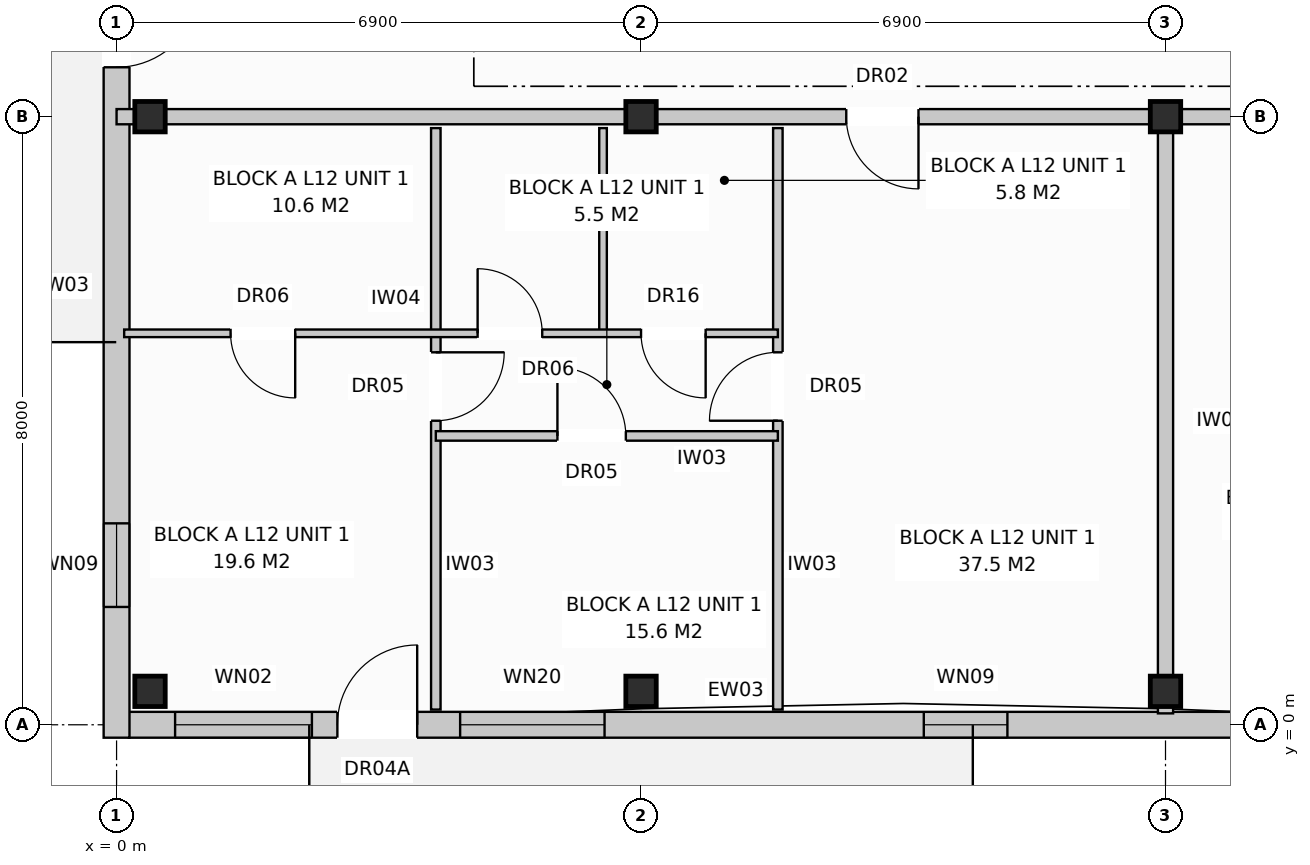
"""IFC4 building model, lengths in metres.
Left out: names, types, materials, properties, quantities, classifications, styles, units other than length and angle.
Written with IfcOpenShell. Run it as: python <this file> out.ifc"""

import sys

from ifc_helpers import new_model, si_unit, direction, frame, frame_2d, origin, origin_with_axes, origin_2d, place, context, subcontext, project, spatial, rectangle, extrude, element, fill, save


model = new_model("IFC4")
c1 = context("Model", 3, precision=1e-05, world=origin(), true_north=direction((0.0, 1.0)))
c2 = subcontext(c1, "Body", "Model", "MODEL_VIEW")
j1 = project(units=[si_unit("LENGTHUNIT", "METRE"), si_unit("PLANEANGLEUNIT", "RADIAN")], contexts=[c1])
p1 = place(None, origin())
s1 = spatial("IfcSite", under=j1, at=p1, CompositionType="ELEMENT")
p2 = place(p1, origin())
s2 = spatial("IfcBuilding", under=s1, at=p2, CompositionType="ELEMENT")
p3 = place(p2, frame((0.0, 0.0, 40.0)))
s3 = spatial("IfcBuildingStorey", under=s2, at=p3, CompositionType="ELEMENT", Elevation=40.0)
for number, where, z_axis, x_axis in (
    (1, (0.44, 0.44, 0.0), (0.0, 0.0, 1.0), (1.0, 0.0, 0.0)),
    (2, (0.44, 8.0, 0.0), (0.0, 0.0, 1.0), (1.0, 0.0, 0.0)),
    (3, (6.9, 0.44, 0.0), (0.0, 0.0, 1.0), (1.0, 0.0, 0.0)),
    (4, (6.9, 8.0, 0.0), (0.0, 0.0, 1.0), (1.0, 0.0, 0.0)),
    (5, (13.8, 0.44, 0.0), (0.0, 0.0, 1.0), (1.0, 0.0, 0.0)),
    (6, (13.8, 8.0, 0.0), (0.0, 0.0, 1.0), (1.0, 0.0, 0.0)),
):
    element("IfcColumn", number, at=place(p3, frame(where, z_axis=z_axis, x_axis=x_axis)), inside=s3, PredefinedType="COLUMN", context=c2, shape_type="SweptSolid", body=[
        extrude(rectangle(XDim=0.4, YDim=0.4, at=origin_2d()), origin(), (0.0, 0.0, 1.0), 3.2),
    ])
p4 = place(p3, frame((0.16, 0.0, 0.0), z_axis=(0.0, 0.0, 1.0), x_axis=(1.0, 0.0, 0.0)))
e7 = element("IfcWall", 7, at=p4, inside=s3, PredefinedType="STANDARD", context=c2, shape_type="SweptSolid", body=[
    extrude(rectangle(XDim=41.08, YDim=0.34, at=frame_2d((20.54, 0.0))), origin(), (0.0, 0.0, 1.0), 2.97),
])
p5 = place(p4, frame((2.745, 0.0, 0.0)))
e8 = element("IfcOpeningElement", 8, at=p5, cuts=e7, PredefinedType="OPENING", context=c2, shape_type="SweptSolid", body=[
    extrude(rectangle(XDim=1.05, YDim=2.12, at=frame_2d((0.525, 1.06))), frame((0.0, 0.182, 0.0), z_axis=(0.0, -1.0, 0.0), x_axis=(1.0, 0.0, 0.0)), (0.0, 0.0, 1.0), 0.364),
])
p6 = place(p4, frame((17.545, 0.0, 0.0)))
e9 = element("IfcOpeningElement", 9, at=p6, cuts=e7, PredefinedType="OPENING", context=c2, shape_type="SweptSolid", body=[
    extrude(rectangle(XDim=1.05, YDim=2.12, at=frame_2d((0.525, 1.06))), frame((0.0, 0.182, 0.0), z_axis=(0.0, -1.0, 0.0), x_axis=(1.0, 0.0, 0.0)), (0.0, 0.0, 1.0), 0.364),
])
p7 = place(p4, frame((30.045, 0.0, 0.0)))
e10 = element("IfcOpeningElement", 10, at=p7, cuts=e7, PredefinedType="OPENING", context=c2, shape_type="SweptSolid", body=[
    extrude(rectangle(XDim=1.05, YDim=2.12, at=frame_2d((0.525, 1.06))), frame((0.0, 0.182, 0.0), z_axis=(0.0, -1.0, 0.0), x_axis=(1.0, 0.0, 0.0)), (0.0, 0.0, 1.0), 0.364),
])
p8 = place(p4, frame((0.61, 0.0, 0.8)))
e11 = element("IfcOpeningElement", 11, at=p8, cuts=e7, PredefinedType="OPENING", context=c2, shape_type="SweptSolid", body=[
    extrude(rectangle(XDim=1.8, YDim=1.7, at=frame_2d((0.9, 0.85))), frame((0.0, 0.182, 0.0), z_axis=(0.0, -1.0, 0.0), x_axis=(1.0, 0.0, 0.0)), (0.0, 0.0, 1.0), 0.364),
])
p9 = place(p4, frame((4.36, 0.0, 0.72)))
e12 = element("IfcOpeningElement", 12, at=p9, cuts=e7, PredefinedType="OPENING", context=c2, shape_type="SweptSolid", body=[
    extrude(rectangle(XDim=1.9, YDim=1.85, at=frame_2d((0.95, 0.925))), frame((0.0, 0.182, 0.0), z_axis=(0.0, -1.0, 0.0), x_axis=(1.0, 0.0, 0.0)), (0.0, 0.0, 1.0), 0.364),
])
p10 = place(p4, frame((10.46, 0.0, 0.72)))
e13 = element("IfcOpeningElement", 13, at=p10, cuts=e7, PredefinedType="OPENING", context=c2, shape_type="SweptSolid", body=[
    extrude(rectangle(XDim=1.1, YDim=1.5, at=frame_2d((0.55, 0.75))), frame((0.0, 0.182, 0.0), z_axis=(0.0, -1.0, 0.0), x_axis=(1.0, 0.0, 0.0)), (0.0, 0.0, 1.0), 0.364),
])
p11 = place(p4, frame((15.76, 0.0, 0.72)))
e14 = element("IfcOpeningElement", 14, at=p11, cuts=e7, PredefinedType="OPENING", context=c2, shape_type="SweptSolid", body=[
    extrude(rectangle(XDim=1.1, YDim=1.5, at=frame_2d((0.55, 0.75))), frame((0.0, 0.182, 0.0), z_axis=(0.0, -1.0, 0.0), x_axis=(1.0, 0.0, 0.0)), (0.0, 0.0, 1.0), 0.364),
])
p12 = place(p4, frame((21.042, 0.0, 0.72)))
e15 = element("IfcOpeningElement", 15, at=p12, cuts=e7, PredefinedType="OPENING", context=c2, shape_type="SweptSolid", body=[
    extrude(rectangle(XDim=1.9, YDim=1.85, at=frame_2d((0.95, 0.925))), frame((0.0, 0.182, 0.0), z_axis=(0.0, -1.0, 0.0), x_axis=(1.0, 0.0, 0.0)), (0.0, 0.0, 1.0), 0.364),
])
p13 = place(p4, frame((24.66, 0.0, 0.72)))
e16 = element("IfcOpeningElement", 16, at=p13, cuts=e7, PredefinedType="OPENING", context=c2, shape_type="SweptSolid", body=[
    extrude(rectangle(XDim=1.1, YDim=1.5, at=frame_2d((0.55, 0.75))), frame((0.0, 0.182, 0.0), z_axis=(0.0, -1.0, 0.0), x_axis=(1.0, 0.0, 0.0)), (0.0, 0.0, 1.0), 0.364),
])
p14 = place(p4, frame((28.21, 0.0, 0.85)))
e17 = element("IfcOpeningElement", 17, at=p14, cuts=e7, PredefinedType="OPENING", context=c2, shape_type="SweptSolid", body=[
    extrude(rectangle(XDim=1.5, YDim=1.65, at=frame_2d((0.75, 0.825))), frame((0.0, 0.182, 0.0), z_axis=(0.0, -1.0, 0.0), x_axis=(1.0, 0.0, 0.0)), (0.0, 0.0, 1.0), 0.364),
])
p15 = place(p4, frame((31.86, 0.0, 0.72)))
e18 = element("IfcOpeningElement", 18, at=p15, cuts=e7, PredefinedType="OPENING", context=c2, shape_type="SweptSolid", body=[
    extrude(rectangle(XDim=1.9, YDim=1.85, at=frame_2d((0.95, 0.925))), frame((0.0, 0.182, 0.0), z_axis=(0.0, -1.0, 0.0), x_axis=(1.0, 0.0, 0.0)), (0.0, 0.0, 1.0), 0.364),
])
p16 = place(p4, frame((35.335, 0.0, 0.8)))
e19 = element("IfcOpeningElement", 19, at=p16, cuts=e7, PredefinedType="OPENING", context=c2, shape_type="SweptSolid", body=[
    extrude(rectangle(XDim=1.95, YDim=1.65, at=frame_2d((0.975, 0.825))), frame((0.0, 0.182, 0.0), z_axis=(0.0, -1.0, 0.0), x_axis=(1.0, 0.0, 0.0)), (0.0, 0.0, 1.0), 0.364),
])
p17 = place(p4, frame((38.675, 0.0, 0.8)))
e20 = element("IfcOpeningElement", 20, at=p17, cuts=e7, PredefinedType="OPENING", context=c2, shape_type="SweptSolid", body=[
    extrude(rectangle(XDim=1.8, YDim=1.7, at=frame_2d((0.9, 0.85))), frame((0.0, 0.182, 0.0), z_axis=(0.0, -1.0, 0.0), x_axis=(1.0, 0.0, 0.0)), (0.0, 0.0, 1.0), 0.364),
])
p18 = place(p3, frame((0.0, -0.17, 0.0), z_axis=(0.0, 0.0, 1.0), x_axis=(0.0, 1.0, 0.0)))
e21 = element("IfcWall", 21, at=p18, inside=s3, PredefinedType="STANDARD", context=c2, shape_type="SweptSolid", body=[
    extrude(rectangle(XDim=18.74, YDim=0.34, at=frame_2d((9.37, 0.0))), origin(), (0.0, 0.0, 1.0), 2.97),
])
p19 = place(p18, frame((8.82, 0.0, 0.0)))
e22 = element("IfcOpeningElement", 22, at=p19, cuts=e21, PredefinedType="OPENING", context=c2, shape_type="SweptSolid", body=[
    extrude(rectangle(XDim=1.1, YDim=2.1, at=frame_2d((0.55, 1.05))), frame((0.0, 0.182, 0.0), z_axis=(0.0, -1.0, 0.0), x_axis=(1.0, 0.0, 0.0)), (0.0, 0.0, 1.0), 0.364),
])
p20 = place(p18, frame((1.72, 0.0, 0.72)))
e23 = element("IfcOpeningElement", 23, at=p20, cuts=e21, PredefinedType="OPENING", context=c2, shape_type="SweptSolid", body=[
    extrude(rectangle(XDim=1.1, YDim=1.5, at=frame_2d((0.55, 0.75))), frame((0.0, 0.182, 0.0), z_axis=(0.0, -1.0, 0.0), x_axis=(1.0, 0.0, 0.0)), (0.0, 0.0, 1.0), 0.364),
])
p21 = place(p18, frame((15.92, 0.0, 0.72)))
e24 = element("IfcOpeningElement", 24, at=p21, cuts=e21, PredefinedType="OPENING", context=c2, shape_type="SweptSolid", body=[
    extrude(rectangle(XDim=1.1, YDim=1.5, at=frame_2d((0.55, 0.75))), frame((0.0, 0.182, 0.0), z_axis=(0.0, -1.0, 0.0), x_axis=(1.0, 0.0, 0.0)), (0.0, 0.0, 1.0), 0.364),
])
p22 = place(p3, frame((13.8, 7.85, 0.0), z_axis=(0.0, 0.0, 1.0), x_axis=(0.0, -1.0, 0.0)))
e25 = element("IfcWall", 25, at=p22, inside=s3, PredefinedType="PARTITIONING", context=c2, shape_type="SweptSolid", body=[
    extrude(rectangle(XDim=7.7, YDim=0.2, at=frame_2d((3.85, 0.0))), origin(), (0.0, 0.0, 1.0), 2.97),
])
p23 = place(p3, frame((0.0, 8.0, 0.0), z_axis=(0.0, 0.0, 1.0), x_axis=(1.0, 0.0, 0.0)))
e26 = element("IfcWall", 26, at=p23, inside=s3, PredefinedType="PARTITIONING", context=c2, shape_type="SweptSolid", body=[
    extrude(rectangle(XDim=13.8, YDim=0.2, at=frame_2d((6.9, 0.0))), origin(), (0.0, 0.0, 1.0), 2.41),
])
p24 = place(p23, frame((9.6, 0.0, 0.0)))
e27 = element("IfcOpeningElement", 27, at=p24, cuts=e26, PredefinedType="OPENING", context=c2, shape_type="SweptSolid", body=[
    extrude(rectangle(XDim=0.95, YDim=2.15, at=frame_2d((0.475, 1.075))), frame((0.0, 0.112, 0.0), z_axis=(0.0, -1.0, 0.0), x_axis=(1.0, 0.0, 0.0)), (0.0, 0.0, 1.0), 0.224),
])
p25 = place(p3, frame((8.7, 7.85, 0.0), z_axis=(0.0, 0.0, 1.0), x_axis=(0.0, -1.0, 0.0)))
e28 = element("IfcWall", 28, at=p25, inside=s3, PredefinedType="PARTITIONING", context=c2, shape_type="SweptSolid", body=[
    extrude(rectangle(XDim=7.65, YDim=0.125, at=frame_2d((3.825, 0.0))), origin(), (0.0, 0.0, 1.0), 2.97),
])
p26 = place(p25, frame((2.95, 0.0, 0.0)))
e29 = element("IfcOpeningElement", 29, at=p26, cuts=e28, PredefinedType="OPENING", context=c2, shape_type="SweptSolid", body=[
    extrude(rectangle(XDim=0.9, YDim=2.1, at=frame_2d((0.45, 1.05))), frame((0.0, 0.074, 0.0), z_axis=(0.0, -1.0, 0.0), x_axis=(1.0, 0.0, 0.0)), (0.0, 0.0, 1.0), 0.149),
])
p27 = place(p3, frame((4.2, 7.85, 0.0), z_axis=(0.0, 0.0, 1.0), x_axis=(0.0, -1.0, 0.0)))
e30 = element("IfcWall", 30, at=p27, inside=s3, PredefinedType="PARTITIONING", context=c2, shape_type="SweptSolid", body=[
    extrude(rectangle(XDim=7.65, YDim=0.125, at=frame_2d((3.825, 0.0))), origin(), (0.0, 0.0, 1.0), 2.97),
])
p28 = place(p27, frame((2.95, 0.0, 0.0)))
e31 = element("IfcOpeningElement", 31, at=p28, cuts=e30, PredefinedType="OPENING", context=c2, shape_type="SweptSolid", body=[
    extrude(rectangle(XDim=0.9, YDim=2.1, at=frame_2d((0.45, 1.05))), frame((0.0, 0.074, 0.0), z_axis=(0.0, -1.0, 0.0), x_axis=(1.0, 0.0, 0.0)), (0.0, 0.0, 1.0), 0.149),
])
p29 = place(p3, frame((6.4, 7.85, 0.0), z_axis=(0.0, 0.0, 1.0), x_axis=(0.0, -1.0, 0.0)))
e32 = element("IfcWall", 32, at=p29, inside=s3, PredefinedType="PARTITIONING", context=c2, shape_type="SweptSolid", body=[
    extrude(rectangle(XDim=2.7, YDim=0.1, at=frame_2d((1.35, 0.0))), origin(), (0.0, 0.0, 1.0), 2.97),
])
p30 = place(p3, frame((0.1, 5.15, 0.0), z_axis=(0.0, 0.0, 1.0), x_axis=(1.0, 0.0, 0.0)))
e33 = element("IfcWall", 33, at=p30, inside=s3, PredefinedType="PARTITIONING", context=c2, shape_type="SweptSolid", body=[
    extrude(rectangle(XDim=8.6, YDim=0.1, at=frame_2d((4.3, 0.0))), origin(), (0.0, 0.0, 1.0), 2.97),
])
p31 = place(p30, frame((1.4, 0.0, 0.0)))
e34 = element("IfcOpeningElement", 34, at=p31, cuts=e33, PredefinedType="OPENING", context=c2, shape_type="SweptSolid", body=[
    extrude(rectangle(XDim=0.85, YDim=2.05, at=frame_2d((0.425, 1.025))), frame((0.0, 0.062, 0.0), z_axis=(0.0, -1.0, 0.0), x_axis=(1.0, 0.0, 0.0)), (0.0, 0.0, 1.0), 0.124),
])
p32 = place(p30, frame((4.65, 0.0, 0.0)))
e35 = element("IfcOpeningElement", 35, at=p32, cuts=e33, PredefinedType="OPENING", context=c2, shape_type="SweptSolid", body=[
    extrude(rectangle(XDim=0.85, YDim=2.05, at=frame_2d((0.425, 1.025))), frame((0.0, 0.062, 0.0), z_axis=(0.0, -1.0, 0.0), x_axis=(1.0, 0.0, 0.0)), (0.0, 0.0, 1.0), 0.124),
])
p33 = place(p30, frame((6.8, 0.0, 0.0)))
e36 = element("IfcOpeningElement", 36, at=p33, cuts=e33, PredefinedType="OPENING", context=c2, shape_type="SweptSolid", body=[
    extrude(rectangle(XDim=0.85, YDim=2.1, at=frame_2d((0.425, 1.05))), frame((0.0, 0.062, 0.0), z_axis=(0.0, -1.0, 0.0), x_axis=(1.0, 0.0, 0.0)), (0.0, 0.0, 1.0), 0.124),
])
p34 = place(p3, frame((4.2, 3.8, 0.0), z_axis=(0.0, 0.0, 1.0), x_axis=(1.0, 0.0, 0.0)))
e37 = element("IfcWall", 37, at=p34, inside=s3, PredefinedType="PARTITIONING", context=c2, shape_type="SweptSolid", body=[
    extrude(rectangle(XDim=4.5, YDim=0.125, at=frame_2d((2.25, 0.0))), origin(), (0.0, 0.0, 1.0), 2.97),
])
p35 = place(p34, frame((1.6, 0.0, 0.0)))
e38 = element("IfcOpeningElement", 38, at=p35, cuts=e37, PredefinedType="OPENING", context=c2, shape_type="SweptSolid", body=[
    extrude(rectangle(XDim=0.9, YDim=2.1, at=frame_2d((0.45, 1.05))), frame((0.0, 0.074, 0.0), z_axis=(0.0, -1.0, 0.0), x_axis=(1.0, 0.0, 0.0)), (0.0, 0.0, 1.0), 0.149),
])
p36 = place(p3, frame((13.8, 8.0, 0.0), z_axis=(0.0, 0.0, 1.0), x_axis=(1.0, 0.0, 0.0)))
e39 = element("IfcWall", 39, at=p36, inside=s3, PredefinedType="PARTITIONING", context=c2, shape_type="SweptSolid", body=[
    extrude(rectangle(XDim=13.8, YDim=0.2, at=frame_2d((6.9, 0.0))), origin(), (0.0, 0.0, 1.0), 2.41),
])
p37 = place(p36, frame((2.4, 0.0, 0.0)))
e40 = element("IfcOpeningElement", 40, at=p37, cuts=e39, PredefinedType="OPENING", context=c2, shape_type="SweptSolid", body=[
    extrude(rectangle(XDim=0.95, YDim=2.15, at=frame_2d((0.475, 1.075))), frame((0.0, 0.112, 0.0), z_axis=(0.0, -1.0, 0.0), x_axis=(1.0, 0.0, 0.0)), (0.0, 0.0, 1.0), 0.224),
])
p38 = place(p5, origin_with_axes())
e41 = element("IfcDoor", 41, at=p38, inside=s3, OperationType="SINGLE_SWING_RIGHT", PredefinedType="DOOR", context=c2, shape_type="SweptSolid", body=[
    extrude(rectangle(XDim=1.05, YDim=2.12, at=frame_2d((0.525, 1.06))), frame((0.0, 0.025, 0.0), z_axis=(0.0, -1.0, 0.0), x_axis=(1.0, 0.0, 0.0)), (0.0, 0.0, 1.0), 0.05),
])
fill(e8, e41)
p39 = place(p8, origin_with_axes())
e42 = element("IfcWindow", 42, at=p39, inside=s3, PartitioningType="SINGLE_PANEL", PredefinedType="WINDOW", context=c2, shape_type="SweptSolid", body=[
    extrude(rectangle(XDim=1.8, YDim=1.7, at=frame_2d((0.9, 0.85))), frame((0.0, 0.03, 0.0), z_axis=(0.0, -1.0, 0.0), x_axis=(1.0, 0.0, 0.0)), (0.0, 0.0, 1.0), 0.06),
])
fill(e11, e42)
p40 = place(p9, origin_with_axes())
e43 = element("IfcWindow", 43, at=p40, inside=s3, PartitioningType="SINGLE_PANEL", PredefinedType="WINDOW", context=c2, shape_type="SweptSolid", body=[
    extrude(rectangle(XDim=1.9, YDim=1.85, at=frame_2d((0.95, 0.925))), frame((0.0, 0.03, 0.0), z_axis=(0.0, -1.0, 0.0), x_axis=(1.0, 0.0, 0.0)), (0.0, 0.0, 1.0), 0.06),
])
fill(e12, e43)
p41 = place(p10, origin_with_axes())
e44 = element("IfcWindow", 44, at=p41, inside=s3, PartitioningType="SINGLE_PANEL", PredefinedType="WINDOW", context=c2, shape_type="SweptSolid", body=[
    extrude(rectangle(XDim=1.1, YDim=1.5, at=frame_2d((0.55, 0.75))), frame((0.0, 0.03, 0.0), z_axis=(0.0, -1.0, 0.0), x_axis=(1.0, 0.0, 0.0)), (0.0, 0.0, 1.0), 0.06),
])
fill(e13, e44)
p42 = place(p19, frame((1.1, 0.0, 0.0), z_axis=(0.0, 0.0, 1.0), x_axis=(-1.0, 0.0, 0.0)))
e45 = element("IfcDoor", 45, at=p42, inside=s3, OperationType="SINGLE_SWING_RIGHT", PredefinedType="DOOR", context=c2, shape_type="SweptSolid", body=[
    extrude(rectangle(XDim=1.1, YDim=2.1, at=frame_2d((0.55, 1.05))), frame((0.0, 0.025, 0.0), z_axis=(0.0, -1.0, 0.0), x_axis=(1.0, 0.0, 0.0)), (0.0, 0.0, 1.0), 0.05),
])
fill(e22, e45)
p43 = place(p20, origin_with_axes())
e46 = element("IfcWindow", 46, at=p43, inside=s3, PartitioningType="SINGLE_PANEL", PredefinedType="WINDOW", context=c2, shape_type="SweptSolid", body=[
    extrude(rectangle(XDim=1.1, YDim=1.5, at=frame_2d((0.55, 0.75))), frame((0.0, 0.03, 0.0), z_axis=(0.0, -1.0, 0.0), x_axis=(1.0, 0.0, 0.0)), (0.0, 0.0, 1.0), 0.06),
])
fill(e23, e46)
p44 = place(p24, frame((0.95, 0.0, 0.0), z_axis=(0.0, 0.0, 1.0), x_axis=(-1.0, 0.0, 0.0)))
e47 = element("IfcDoor", 47, at=p44, inside=s3, OperationType="SINGLE_SWING_RIGHT", PredefinedType="DOOR", context=c2, shape_type="SweptSolid", body=[
    extrude(rectangle(XDim=0.95, YDim=2.15, at=frame_2d((0.475, 1.075))), frame((0.0, 0.025, 0.0), z_axis=(0.0, -1.0, 0.0), x_axis=(1.0, 0.0, 0.0)), (0.0, 0.0, 1.0), 0.05),
])
fill(e27, e47)
p45 = place(p26, frame((0.9, 0.0, 0.0), z_axis=(0.0, 0.0, 1.0), x_axis=(-1.0, 0.0, 0.0)))
e48 = element("IfcDoor", 48, at=p45, inside=s3, OperationType="SINGLE_SWING_RIGHT", PredefinedType="DOOR", context=c2, shape_type="SweptSolid", body=[
    extrude(rectangle(XDim=0.9, YDim=2.1, at=frame_2d((0.45, 1.05))), frame((0.0, 0.025, 0.0), z_axis=(0.0, -1.0, 0.0), x_axis=(1.0, 0.0, 0.0)), (0.0, 0.0, 1.0), 0.05),
])
fill(e29, e48)
p46 = place(p28, origin_with_axes())
e49 = element("IfcDoor", 49, at=p46, inside=s3, OperationType="SINGLE_SWING_LEFT", PredefinedType="DOOR", context=c2, shape_type="SweptSolid", body=[
    extrude(rectangle(XDim=0.9, YDim=2.1, at=frame_2d((0.45, 1.05))), frame((0.0, 0.025, 0.0), z_axis=(0.0, -1.0, 0.0), x_axis=(1.0, 0.0, 0.0)), (0.0, 0.0, 1.0), 0.05),
])
fill(e31, e49)
p47 = place(p31, frame((0.85, 0.0, 0.0), z_axis=(0.0, 0.0, 1.0), x_axis=(-1.0, 0.0, 0.0)))
e50 = element("IfcDoor", 50, at=p47, inside=s3, OperationType="SINGLE_SWING_RIGHT", PredefinedType="DOOR", context=c2, shape_type="SweptSolid", body=[
    extrude(rectangle(XDim=0.85, YDim=2.05, at=frame_2d((0.425, 1.025))), frame((0.0, 0.025, 0.0), z_axis=(0.0, -1.0, 0.0), x_axis=(1.0, 0.0, 0.0)), (0.0, 0.0, 1.0), 0.05),
])
fill(e34, e50)
p48 = place(p32, origin_with_axes())
e51 = element("IfcDoor", 51, at=p48, inside=s3, OperationType="SINGLE_SWING_LEFT", PredefinedType="DOOR", context=c2, shape_type="SweptSolid", body=[
    extrude(rectangle(XDim=0.85, YDim=2.05, at=frame_2d((0.425, 1.025))), frame((0.0, 0.025, 0.0), z_axis=(0.0, -1.0, 0.0), x_axis=(1.0, 0.0, 0.0)), (0.0, 0.0, 1.0), 0.05),
])
fill(e35, e51)
p49 = place(p33, frame((0.85, 0.0, 0.0), z_axis=(0.0, 0.0, 1.0), x_axis=(-1.0, 0.0, 0.0)))
e52 = element("IfcDoor", 52, at=p49, inside=s3, OperationType="SINGLE_SWING_RIGHT", PredefinedType="DOOR", context=c2, shape_type="SweptSolid", body=[
    extrude(rectangle(XDim=0.85, YDim=2.1, at=frame_2d((0.425, 1.05))), frame((0.0, 0.025, 0.0), z_axis=(0.0, -1.0, 0.0), x_axis=(1.0, 0.0, 0.0)), (0.0, 0.0, 1.0), 0.05),
])
fill(e36, e52)
p50 = place(p35, origin_with_axes())
e53 = element("IfcDoor", 53, at=p50, inside=s3, OperationType="SINGLE_SWING_LEFT", PredefinedType="DOOR", context=c2, shape_type="SweptSolid", body=[
    extrude(rectangle(XDim=0.9, YDim=2.1, at=frame_2d((0.45, 1.05))), frame((0.0, 0.025, 0.0), z_axis=(0.0, -1.0, 0.0), x_axis=(1.0, 0.0, 0.0)), (0.0, 0.0, 1.0), 0.05),
])
fill(e38, e53)
save(model, sys.argv[1])
